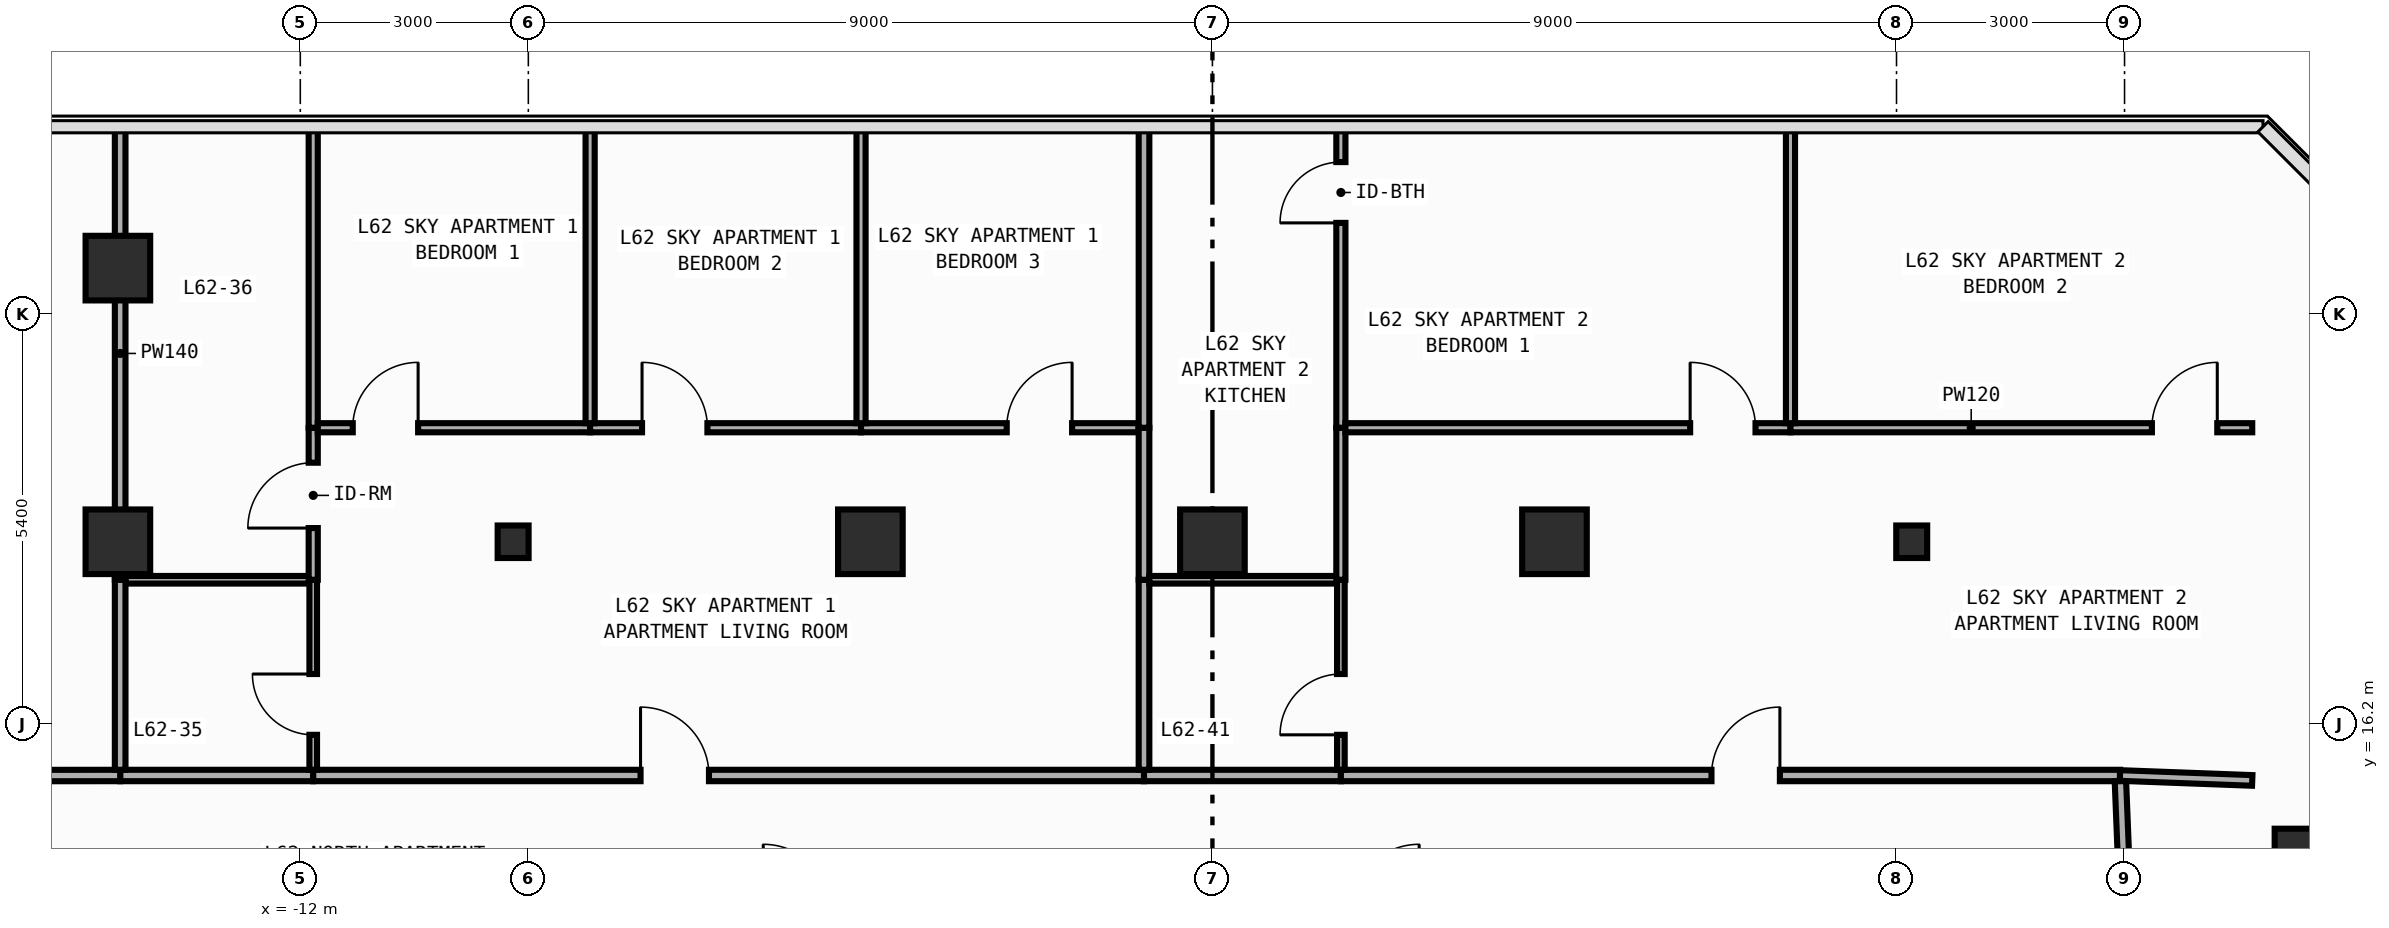
"""IFC4 building model, lengths in metres.
Left out: names, types, materials, properties, quantities, classifications, styles, units other than length and angle.
Written with IfcOpenShell. Run it as: python <this file> out.ifc"""

import sys

from ifc_helpers import new_model, si_unit, direction, frame, frame_2d, origin, origin_2d, place, context, subcontext, project, spatial, rectangle, i_section, extrude, element, fill, save


model = new_model("IFC4")
c1 = context("Model", 3, precision=1e-05, world=origin(), true_north=direction((0.0, 1.0)))
c2 = subcontext(c1, "Body", "Model", "MODEL_VIEW")
j1 = project(units=[si_unit("LENGTHUNIT", "METRE"), si_unit("PLANEANGLEUNIT", "RADIAN")], contexts=[c1])
p1 = place(None, origin())
s1 = spatial("IfcSite", under=j1, at=p1, CompositionType="ELEMENT")
p2 = place(p1, origin())
s2 = spatial("IfcBuilding", under=s1, at=p2, CompositionType="ELEMENT")
p3 = place(p2, frame((0.0, 0.0, 262.0)))
s3 = spatial("IfcBuildingStorey", under=s2, at=p3, CompositionType="ELEMENT", Elevation=262.0)
for number, where, z_axis, x_axis in (
    (1, (-9.2, 18.6, 0.0), (0.0, 0.0, 1.0), (1.0, 0.0, 0.0)),
    (2, (9.2, 18.6, 0.0), (0.0, 0.0, 1.0), (1.0, 0.0, 0.0)),
):
    element("IfcColumn", number, at=place(p3, frame(where, z_axis=z_axis, x_axis=x_axis)), inside=s3, PredefinedType="COLUMN", context=c2, shape_type="SweptSolid", body=[
        extrude(i_section(OverallWidth=0.407, OverallDepth=0.428, WebThickness=0.02, FlangeThickness=0.035, FilletRadius=0.022, at=origin_2d()), origin(), (0.0, 0.0, 1.0), 3.6),
    ])
for number, where, z_axis, x_axis in (
    (3, (-14.4, 18.6, 0.0), (0.0, 0.0, 1.0), (1.0, 0.0, 0.0)),
    (4, (14.4, 14.4, 0.0), (0.0, 0.0, 1.0), (1.0, 0.0, 0.0)),
    (5, (-4.5, 18.6, 0.0), (0.0, 0.0, 1.0), (1.0, 0.0, 0.0)),
    (6, (0.0, 18.6, 0.0), (0.0, 0.0, 1.0), (1.0, 0.0, 0.0)),
    (7, (4.5, 18.6, 0.0), (0.0, 0.0, 1.0), (1.0, 0.0, 0.0)),
    (8, (-14.4, 22.2, 0.0), (0.0, 0.0, 1.0), (1.0, 0.0, 0.0)),
):
    element("IfcColumn", number, at=place(p3, frame(where, z_axis=z_axis, x_axis=x_axis)), inside=s3, PredefinedType="COLUMN", context=c2, shape_type="SweptSolid", body=[
        extrude(rectangle(XDim=0.85, YDim=0.85, at=origin_2d()), origin(), (0.0, 0.0, 1.0), 3.6),
    ])
p4 = place(p3, frame((-14.37, 15.525, 0.0), z_axis=(0.0, 0.0, 1.0), x_axis=(1.0, 0.0, 0.0)))
e9 = element("IfcWall", 9, at=p4, inside=s3, PredefinedType="PARTITIONING", context=c2, shape_type="SweptSolid", body=[
    extrude(rectangle(XDim=2.54, YDim=0.15, at=frame_2d((1.27, 0.0))), origin(), (0.0, 0.0, 1.0), 3.34),
])
p5 = place(p3, frame((-11.83, 15.525, 0.0), z_axis=(0.0, 0.0, 1.0), x_axis=(1.0, 0.0, 0.0)))
e10 = element("IfcWall", 10, at=p5, inside=s3, PredefinedType="PARTITIONING", context=c2, shape_type="SweptSolid", body=[
    extrude(rectangle(XDim=10.93, YDim=0.15, at=frame_2d((5.465, 0.0))), origin(), (0.0, 0.0, 1.0), 3.34),
])
p6 = place(p5, frame((4.306, 0.0, 0.0)))
e11 = element("IfcOpeningElement", 11, at=p6, cuts=e10, PredefinedType="OPENING", context=c2, shape_type="SweptSolid", body=[
    extrude(rectangle(XDim=0.9, YDim=2.15, at=frame_2d((0.45, 1.075))), frame((0.0, 0.085, 0.0), z_axis=(0.0, -1.0, 0.0), x_axis=(1.0, 0.0, 0.0)), (0.0, 0.0, 1.0), 0.17),
])
p7 = place(p3, frame((-0.9, 15.525, 0.0), z_axis=(0.0, 0.0, 1.0), x_axis=(1.0, 0.0, 0.0)))
e12 = element("IfcWall", 12, at=p7, inside=s3, PredefinedType="PARTITIONING", context=c2, shape_type="SweptSolid", body=[
    extrude(rectangle(XDim=2.59, YDim=0.15, at=frame_2d((1.295, 0.0))), origin(), (0.0, 0.0, 1.0), 3.34),
])
p8 = place(p3, frame((1.69, 15.525, 0.0), z_axis=(0.0, 0.0, 1.0), x_axis=(1.0, 0.0, 0.0)))
e13 = element("IfcWall", 13, at=p8, inside=s3, PredefinedType="PARTITIONING", context=c2, shape_type="SweptSolid", body=[
    extrude(rectangle(XDim=10.25, YDim=0.15, at=frame_2d((5.125, 0.0))), origin(), (0.0, 0.0, 1.0), 3.34),
])
p9 = place(p8, frame((4.876, 0.0, 0.0)))
e14 = element("IfcOpeningElement", 14, at=p9, cuts=e13, PredefinedType="OPENING", context=c2, shape_type="SweptSolid", body=[
    extrude(rectangle(XDim=0.9, YDim=2.15, at=frame_2d((0.45, 1.075))), frame((0.0, 0.085, 0.0), z_axis=(0.0, -1.0, 0.0), x_axis=(1.0, 0.0, 0.0)), (0.0, 0.0, 1.0), 0.17),
])
p10 = place(p3, frame((12.015, 13.72, 0.0), z_axis=(0.0, 0.0, 1.0), x_axis=(-0.040046877756, 0.99919780203, 0.0)))
e15 = element("IfcWall", 15, at=p10, inside=s3, PredefinedType="PARTITIONING", context=c2, shape_type="SweptSolid", body=[
    extrude(rectangle(XDim=1.731, YDim=0.15, at=frame_2d((0.866, 0.0))), origin(), (0.0, 0.0, 1.0), 3.34),
])
p11 = place(p3, frame((-21.255, 15.52, 0.0), z_axis=(0.0, 0.0, 1.0), x_axis=(0.999999748504, 0.00070921968, 0.0)))
e16 = element("IfcWall", 16, at=p11, inside=s3, PredefinedType="PARTITIONING", context=c2, shape_type="SweptSolid", body=[
    extrude(rectangle(XDim=6.885, YDim=0.15, at=frame_2d((3.442, 0.0))), origin(), (0.0, 0.0, 1.0), 3.34),
])
p12 = place(p11, frame((3.499, 0.0, 0.0)))
e17 = element("IfcOpeningElement", 17, at=p12, cuts=e16, PredefinedType="OPENING", context=c2, shape_type="SweptSolid", body=[
    extrude(rectangle(XDim=0.9, YDim=2.15, at=frame_2d((0.45, 1.075))), frame((0.0, 0.085, 0.0), z_axis=(0.0, -1.0, 0.0), x_axis=(1.0, 0.0, 0.0)), (0.0, 0.0, 1.0), 0.17),
])
p13 = place(p3, frame((-14.3, 18.1, 0.0), z_axis=(0.0, 0.0, 1.0), x_axis=(1.0, 0.0, 0.0)))
e18 = element("IfcWall", 18, at=p13, inside=s3, PredefinedType="PARTITIONING", context=c2, shape_type="SweptSolid", body=[
    extrude(rectangle(XDim=2.42, YDim=0.1, at=frame_2d((1.21, 0.0))), origin(), (0.0, 0.0, 1.0), 3.34),
])
p14 = place(p3, frame((-11.83, 15.6, 0.0), z_axis=(0.0, 0.0, 1.0), x_axis=(0.0, 1.0, 0.0)))
e19 = element("IfcWall", 19, at=p14, inside=s3, PredefinedType="PARTITIONING", context=c2, shape_type="SweptSolid", body=[
    extrude(rectangle(XDim=2.5, YDim=0.1, at=frame_2d((1.25, 0.0))), origin(), (0.0, 0.0, 1.0), 3.34),
])
p15 = place(p14, frame((0.46, 0.0, 0.0)))
e20 = element("IfcOpeningElement", 20, at=p15, cuts=e19, PredefinedType="OPENING", context=c2, shape_type="SweptSolid", body=[
    extrude(rectangle(XDim=0.8, YDim=2.1, at=frame_2d((0.4, 1.05))), frame((0.0, 0.06, 0.0), z_axis=(0.0, -1.0, 0.0), x_axis=(1.0, 0.0, 0.0)), (0.0, 0.0, 1.0), 0.12),
])
p16 = place(p3, frame((-14.37, 15.6, 0.0), z_axis=(0.0, 0.0, 1.0), x_axis=(0.0, 1.0, 0.0)))
e21 = element("IfcWall", 21, at=p16, inside=s3, PredefinedType="PARTITIONING", context=c2, shape_type="SweptSolid", body=[
    extrude(rectangle(XDim=2.5, YDim=0.14, at=frame_2d((1.25, 0.0))), origin(), (0.0, 0.0, 1.0), 2.44),
])
p17 = place(p3, frame((-11.83, 18.1, 0.0), z_axis=(0.0, 0.0, 1.0), x_axis=(0.0, 1.0, 0.0)))
e22 = element("IfcWall", 22, at=p17, inside=s3, PredefinedType="PARTITIONING", context=c2, shape_type="SweptSolid", body=[
    extrude(rectangle(XDim=2.0, YDim=0.12, at=frame_2d((1.0, 0.0))), origin(), (0.0, 0.0, 1.0), 3.34),
])
p18 = place(p17, frame((0.68, 0.0, 0.0)))
e23 = element("IfcOpeningElement", 23, at=p18, cuts=e22, PredefinedType="OPENING", context=c2, shape_type="SweptSolid", body=[
    extrude(rectangle(XDim=0.86, YDim=2.15, at=frame_2d((0.43, 1.075))), frame((0.0, 0.07, 0.0), z_axis=(0.0, -1.0, 0.0), x_axis=(1.0, 0.0, 0.0)), (0.0, 0.0, 1.0), 0.14),
])
p19 = place(p3, frame((-11.83, 20.1, 0.0), z_axis=(0.0, 0.0, 1.0), x_axis=(0.0, 1.0, 0.0)))
e24 = element("IfcWall", 24, at=p19, inside=s3, PredefinedType="PARTITIONING", context=c2, shape_type="SweptSolid", body=[
    extrude(rectangle(XDim=3.955, YDim=0.12, at=frame_2d((1.978, 0.0))), origin(), (0.0, 0.0, 1.0), 3.34),
])
p20 = place(p3, frame((-14.37, 18.1, 0.0), z_axis=(0.0, 0.0, 1.0), x_axis=(0.0, 1.0, 0.0)))
e25 = element("IfcWall", 25, at=p20, inside=s3, PredefinedType="PARTITIONING", context=c2, shape_type="SweptSolid", body=[
    extrude(rectangle(XDim=5.955, YDim=0.14, at=frame_2d((2.978, 0.0))), origin(), (0.0, 0.0, 1.0), 2.44),
])
p21 = place(p3, frame((-11.77, 20.1, 0.0), z_axis=(0.0, 0.0, 1.0), x_axis=(1.0, 0.0, 0.0)))
e26 = element("IfcWall", 26, at=p21, inside=s3, PredefinedType="PARTITIONING", context=c2, shape_type="SweptSolid", body=[
    extrude(rectangle(XDim=3.583, YDim=0.12, at=frame_2d((1.792, 0.0))), origin(), (0.0, 0.0, 1.0), 3.34),
])
p22 = place(p21, frame((0.46, 0.0, 0.0)))
e27 = element("IfcOpeningElement", 27, at=p22, cuts=e26, PredefinedType="OPENING", context=c2, shape_type="SweptSolid", body=[
    extrude(rectangle(XDim=0.86, YDim=2.15, at=frame_2d((0.43, 1.075))), frame((0.0, 0.07, 0.0), z_axis=(0.0, -1.0, 0.0), x_axis=(1.0, 0.0, 0.0)), (0.0, 0.0, 1.0), 0.14),
])
p23 = place(p3, frame((-8.187, 20.1, 0.0), z_axis=(0.0, 0.0, 1.0), x_axis=(1.0, 0.0, 0.0)))
e28 = element("IfcWall", 28, at=p23, inside=s3, PredefinedType="PARTITIONING", context=c2, shape_type="SweptSolid", body=[
    extrude(rectangle(XDim=3.564, YDim=0.12, at=frame_2d((1.782, 0.0))), origin(), (0.0, 0.0, 1.0), 3.34),
])
p24 = place(p23, frame((0.683, 0.0, 0.0)))
e29 = element("IfcOpeningElement", 29, at=p24, cuts=e28, PredefinedType="OPENING", context=c2, shape_type="SweptSolid", body=[
    extrude(rectangle(XDim=0.86, YDim=2.15, at=frame_2d((0.43, 1.075))), frame((0.0, 0.07, 0.0), z_axis=(0.0, -1.0, 0.0), x_axis=(1.0, 0.0, 0.0)), (0.0, 0.0, 1.0), 0.14),
])
p25 = place(p3, frame((-4.623, 20.1, 0.0), z_axis=(0.0, 0.0, 1.0), x_axis=(1.0, 0.0, 0.0)))
e30 = element("IfcWall", 30, at=p25, inside=s3, PredefinedType="PARTITIONING", context=c2, shape_type="SweptSolid", body=[
    extrude(rectangle(XDim=3.653, YDim=0.12, at=frame_2d((1.827, 0.0))), origin(), (0.0, 0.0, 1.0), 3.34),
])
p26 = place(p25, frame((1.917, 0.0, 0.0)))
e31 = element("IfcOpeningElement", 31, at=p26, cuts=e30, PredefinedType="OPENING", context=c2, shape_type="SweptSolid", body=[
    extrude(rectangle(XDim=0.86, YDim=2.15, at=frame_2d((0.43, 1.075))), frame((0.0, 0.07, 0.0), z_axis=(0.0, -1.0, 0.0), x_axis=(1.0, 0.0, 0.0)), (0.0, 0.0, 1.0), 0.14),
])
p27 = place(p3, frame((-0.9, 15.6, 0.0), z_axis=(0.0, 0.0, 1.0), x_axis=(0.0, 1.0, 0.0)))
e32 = element("IfcWall", 32, at=p27, inside=s3, PredefinedType="PARTITIONING", context=c2, shape_type="SweptSolid", body=[
    extrude(rectangle(XDim=2.5, YDim=0.14, at=frame_2d((1.25, 0.0))), origin(), (0.0, 0.0, 1.0), 3.34),
])
p28 = place(p3, frame((-0.9, 18.1, 0.0), z_axis=(0.0, 0.0, 1.0), x_axis=(0.0, 1.0, 0.0)))
e33 = element("IfcWall", 33, at=p28, inside=s3, PredefinedType="PARTITIONING", context=c2, shape_type="SweptSolid", body=[
    extrude(rectangle(XDim=2.0, YDim=0.14, at=frame_2d((1.0, 0.0))), origin(), (0.0, 0.0, 1.0), 3.34),
])
for number, where, z_axis, x_axis in (
    (34, (-8.187, 20.16, 0.0), (0.0, 0.0, 1.0), (0.0, 1.0, 0.0)),
    (35, (-4.623, 20.16, 0.0), (0.0, 0.0, 1.0), (0.0, 1.0, 0.0)),
):
    element("IfcWall", number, at=place(p3, frame(where, z_axis=z_axis, x_axis=x_axis)), inside=s3, PredefinedType="PARTITIONING", context=c2, shape_type="SweptSolid", body=[
        extrude(rectangle(XDim=3.895, YDim=0.12, at=frame_2d((1.948, 0.0))), origin(), (0.0, 0.0, 1.0), 3.34),
    ])
p29 = place(p3, frame((-0.9, 20.1, 0.0), z_axis=(0.0, 0.0, 1.0), x_axis=(0.0, 1.0, 0.0)))
e36 = element("IfcWall", 36, at=p29, inside=s3, PredefinedType="PARTITIONING", context=c2, shape_type="SweptSolid", body=[
    extrude(rectangle(XDim=3.955, YDim=0.14, at=frame_2d((1.978, 0.0))), origin(), (0.0, 0.0, 1.0), 3.34),
])
p30 = place(p3, frame((-0.83, 18.1, 0.0), z_axis=(0.0, 0.0, 1.0), x_axis=(1.0, 0.0, 0.0)))
e37 = element("IfcWall", 37, at=p30, inside=s3, PredefinedType="PARTITIONING", context=c2, shape_type="SweptSolid", body=[
    extrude(rectangle(XDim=2.47, YDim=0.1, at=frame_2d((1.235, 0.0))), origin(), (0.0, 0.0, 1.0), 3.34),
])
p31 = place(p3, frame((1.69, 15.6, 0.0), z_axis=(0.0, 0.0, 1.0), x_axis=(0.0, 1.0, 0.0)))
e38 = element("IfcWall", 38, at=p31, inside=s3, PredefinedType="PARTITIONING", context=c2, shape_type="SweptSolid", body=[
    extrude(rectangle(XDim=2.5, YDim=0.1, at=frame_2d((1.25, 0.0))), origin(), (0.0, 0.0, 1.0), 3.34),
])
p32 = place(p31, frame((0.46, 0.0, 0.0)))
e39 = element("IfcOpeningElement", 39, at=p32, cuts=e38, PredefinedType="OPENING", context=c2, shape_type="SweptSolid", body=[
    extrude(rectangle(XDim=0.8, YDim=2.1, at=frame_2d((0.4, 1.05))), frame((0.0, 0.06, 0.0), z_axis=(0.0, -1.0, 0.0), x_axis=(1.0, 0.0, 0.0)), (0.0, 0.0, 1.0), 0.12),
])
p33 = place(p3, frame((1.69, 18.1, 0.0), z_axis=(0.0, 0.0, 1.0), x_axis=(0.0, 1.0, 0.0)))
e40 = element("IfcWall", 40, at=p33, inside=s3, PredefinedType="PARTITIONING", context=c2, shape_type="SweptSolid", body=[
    extrude(rectangle(XDim=2.0, YDim=0.12, at=frame_2d((1.0, 0.0))), origin(), (0.0, 0.0, 1.0), 3.34),
])
p34 = place(p3, frame((1.69, 20.1, 0.0), z_axis=(0.0, 0.0, 1.0), x_axis=(0.0, 1.0, 0.0)))
e41 = element("IfcWall", 41, at=p34, inside=s3, PredefinedType="PARTITIONING", context=c2, shape_type="SweptSolid", body=[
    extrude(rectangle(XDim=3.955, YDim=0.12, at=frame_2d((1.978, 0.0))), origin(), (0.0, 0.0, 1.0), 3.34),
])
p35 = place(p34, frame((2.695, 0.0, 0.0)))
e42 = element("IfcOpeningElement", 42, at=p35, cuts=e41, PredefinedType="OPENING", context=c2, shape_type="SweptSolid", body=[
    extrude(rectangle(XDim=0.8, YDim=2.1, at=frame_2d((0.4, 1.05))), frame((0.0, 0.07, 0.0), z_axis=(0.0, -1.0, 0.0), x_axis=(1.0, 0.0, 0.0)), (0.0, 0.0, 1.0), 0.14),
])
p36 = place(p3, frame((1.75, 20.1, 0.0), z_axis=(0.0, 0.0, 1.0), x_axis=(1.0, 0.0, 0.0)))
e43 = element("IfcWall", 43, at=p36, inside=s3, PredefinedType="PARTITIONING", context=c2, shape_type="SweptSolid", body=[
    extrude(rectangle(XDim=5.855, YDim=0.12, at=frame_2d((2.927, 0.0))), origin(), (0.0, 0.0, 1.0), 3.34),
])
p37 = place(p36, frame((4.535, 0.0, 0.0)))
e44 = element("IfcOpeningElement", 44, at=p37, cuts=e43, PredefinedType="OPENING", context=c2, shape_type="SweptSolid", body=[
    extrude(rectangle(XDim=0.86, YDim=2.15, at=frame_2d((0.43, 1.075))), frame((0.0, 0.07, 0.0), z_axis=(0.0, -1.0, 0.0), x_axis=(1.0, 0.0, 0.0)), (0.0, 0.0, 1.0), 0.14),
])
p38 = place(p3, frame((7.605, 20.1, 0.0), z_axis=(0.0, 0.0, 1.0), x_axis=(1.0, 0.0, 0.0)))
e45 = element("IfcWall", 45, at=p38, inside=s3, PredefinedType="PARTITIONING", context=c2, shape_type="SweptSolid", body=[
    extrude(rectangle(XDim=6.075, YDim=0.12, at=frame_2d((3.038, 0.0))), origin(), (0.0, 0.0, 1.0), 3.34),
])
p39 = place(p38, frame((4.755, 0.0, 0.0)))
e46 = element("IfcOpeningElement", 46, at=p39, cuts=e45, PredefinedType="OPENING", context=c2, shape_type="SweptSolid", body=[
    extrude(rectangle(XDim=0.86, YDim=2.15, at=frame_2d((0.43, 1.075))), frame((0.0, 0.07, 0.0), z_axis=(0.0, -1.0, 0.0), x_axis=(1.0, 0.0, 0.0)), (0.0, 0.0, 1.0), 0.14),
])
p40 = place(p3, frame((11.94, 15.525, 0.0), z_axis=(0.0, 0.0, 1.0), x_axis=(0.999304229002, -0.037296888581, 0.0)))
e47 = element("IfcWall", 47, at=p40, inside=s3, PredefinedType="PARTITIONING", context=c2, shape_type="SweptSolid", body=[
    extrude(rectangle(XDim=1.741, YDim=0.14, at=frame_2d((0.871, 0.0))), origin(), (0.0, 0.0, 1.0), 3.34),
])
p41 = place(p3, frame((7.605, 20.16, 0.0), z_axis=(0.0, 0.0, 1.0), x_axis=(0.0, 1.0, 0.0)))
e48 = element("IfcWall", 48, at=p41, inside=s3, PredefinedType="PARTITIONING", context=c2, shape_type="SweptSolid", body=[
    extrude(rectangle(XDim=3.895, YDim=0.12, at=frame_2d((1.948, 0.0))), origin(), (0.0, 0.0, 1.0), 3.34),
])
p42 = place(p6, origin())
e49 = element("IfcDoor", 49, at=p42, inside=s3, OperationType="SINGLE_SWING_LEFT", PredefinedType="DOOR", context=c2, shape_type="SweptSolid", body=[
    extrude(rectangle(XDim=0.9, YDim=2.15, at=frame_2d((0.45, 1.075))), frame((0.0, 0.025, 0.0), z_axis=(0.0, -1.0, 0.0), x_axis=(1.0, 0.0, 0.0)), (0.0, 0.0, 1.0), 0.05),
])
fill(e11, e49)
p43 = place(p9, origin())
e50 = element("IfcDoor", 50, at=p43, inside=s3, OperationType="SINGLE_SWING_RIGHT", PredefinedType="DOOR", context=c2, shape_type="SweptSolid", body=[
    extrude(rectangle(XDim=0.9, YDim=2.15, at=frame_2d((0.45, 1.075))), frame((0.0, 0.025, 0.0), z_axis=(0.0, -1.0, 0.0), x_axis=(1.0, 0.0, 0.0)), (0.0, 0.0, 1.0), 0.05),
])
fill(e14, e50)
p44 = place(p15, origin())
e51 = element("IfcDoor", 51, at=p44, inside=s3, OperationType="SINGLE_SWING_RIGHT", PredefinedType="DOOR", context=c2, shape_type="SweptSolid", body=[
    extrude(rectangle(XDim=0.8, YDim=2.1, at=frame_2d((0.4, 1.05))), frame((0.0, 0.025, 0.0), z_axis=(0.0, -1.0, 0.0), x_axis=(1.0, 0.0, 0.0)), (0.0, 0.0, 1.0), 0.05),
])
fill(e20, e51)
p45 = place(p18, origin())
e52 = element("IfcDoor", 52, at=p45, inside=s3, OperationType="SINGLE_SWING_LEFT", PredefinedType="DOOR", context=c2, shape_type="SweptSolid", body=[
    extrude(rectangle(XDim=0.86, YDim=2.15, at=frame_2d((0.43, 1.075))), frame((0.0, 0.025, 0.0), z_axis=(0.0, -1.0, 0.0), x_axis=(1.0, 0.0, 0.0)), (0.0, 0.0, 1.0), 0.05),
])
fill(e23, e52)
p46 = place(p22, origin())
e53 = element("IfcDoor", 53, at=p46, inside=s3, OperationType="SINGLE_SWING_RIGHT", PredefinedType="DOOR", context=c2, shape_type="SweptSolid", body=[
    extrude(rectangle(XDim=0.86, YDim=2.15, at=frame_2d((0.43, 1.075))), frame((0.0, 0.025, 0.0), z_axis=(0.0, -1.0, 0.0), x_axis=(1.0, 0.0, 0.0)), (0.0, 0.0, 1.0), 0.05),
])
fill(e27, e53)
p47 = place(p24, origin())
e54 = element("IfcDoor", 54, at=p47, inside=s3, OperationType="SINGLE_SWING_LEFT", PredefinedType="DOOR", context=c2, shape_type="SweptSolid", body=[
    extrude(rectangle(XDim=0.86, YDim=2.15, at=frame_2d((0.43, 1.075))), frame((0.0, 0.025, 0.0), z_axis=(0.0, -1.0, 0.0), x_axis=(1.0, 0.0, 0.0)), (0.0, 0.0, 1.0), 0.05),
])
fill(e29, e54)
p48 = place(p26, origin())
e55 = element("IfcDoor", 55, at=p48, inside=s3, OperationType="SINGLE_SWING_RIGHT", PredefinedType="DOOR", context=c2, shape_type="SweptSolid", body=[
    extrude(rectangle(XDim=0.86, YDim=2.15, at=frame_2d((0.43, 1.075))), frame((0.0, 0.025, 0.0), z_axis=(0.0, -1.0, 0.0), x_axis=(1.0, 0.0, 0.0)), (0.0, 0.0, 1.0), 0.05),
])
fill(e31, e55)
p49 = place(p32, origin())
e56 = element("IfcDoor", 56, at=p49, inside=s3, OperationType="SINGLE_SWING_LEFT", PredefinedType="DOOR", context=c2, shape_type="SweptSolid", body=[
    extrude(rectangle(XDim=0.8, YDim=2.1, at=frame_2d((0.4, 1.05))), frame((0.0, 0.025, 0.0), z_axis=(0.0, -1.0, 0.0), x_axis=(1.0, 0.0, 0.0)), (0.0, 0.0, 1.0), 0.05),
])
fill(e39, e56)
p50 = place(p37, origin())
e57 = element("IfcDoor", 57, at=p50, inside=s3, OperationType="SINGLE_SWING_LEFT", PredefinedType="DOOR", context=c2, shape_type="SweptSolid", body=[
    extrude(rectangle(XDim=0.86, YDim=2.15, at=frame_2d((0.43, 1.075))), frame((0.0, 0.025, 0.0), z_axis=(0.0, -1.0, 0.0), x_axis=(1.0, 0.0, 0.0)), (0.0, 0.0, 1.0), 0.05),
])
fill(e44, e57)
p51 = place(p39, origin())
e58 = element("IfcDoor", 58, at=p51, inside=s3, OperationType="SINGLE_SWING_RIGHT", PredefinedType="DOOR", context=c2, shape_type="SweptSolid", body=[
    extrude(rectangle(XDim=0.86, YDim=2.15, at=frame_2d((0.43, 1.075))), frame((0.0, 0.025, 0.0), z_axis=(0.0, -1.0, 0.0), x_axis=(1.0, 0.0, 0.0)), (0.0, 0.0, 1.0), 0.05),
])
fill(e46, e58)
p52 = place(p35, origin())
e59 = element("IfcDoor", 59, at=p52, inside=s3, OperationType="SINGLE_SWING_LEFT", PredefinedType="DOOR", context=c2, shape_type="SweptSolid", body=[
    extrude(rectangle(XDim=0.8, YDim=2.1, at=frame_2d((0.4, 1.05))), frame((0.0, 0.025, 0.0), z_axis=(0.0, -1.0, 0.0), x_axis=(1.0, 0.0, 0.0)), (0.0, 0.0, 1.0), 0.05),
])
fill(e42, e59)
save(model, sys.argv[1])
